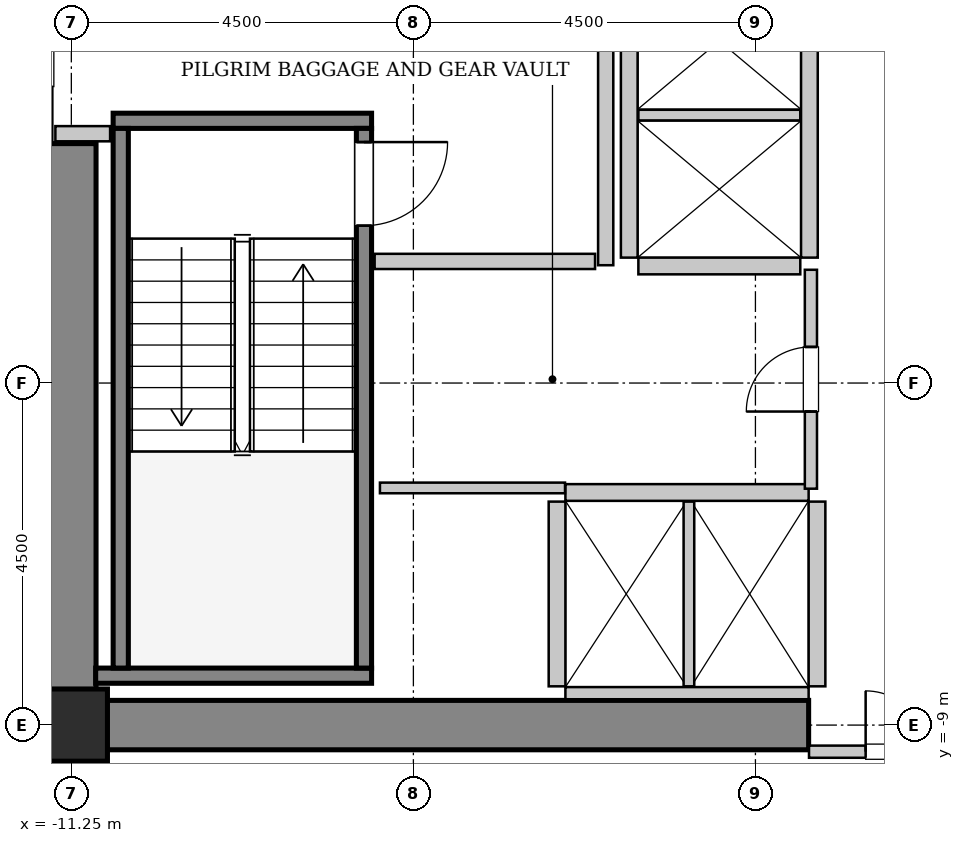
"""IFC4 building model, lengths in metres.
Left out: names, types, materials, properties, quantities, classifications, styles, units other than length and angle.
Written with IfcOpenShell. Run it as: python <this file> out.ifc"""

import sys

from ifc_helpers import new_model, si_unit, direction, frame, frame_2d, origin, origin_2d, place, context, subcontext, project, spatial, rectangle, hollow_rectangle, extrude, source, transform, mapped, element, fill, save


model = new_model("IFC4")
c1 = context("Model", 3, precision=1e-05, world=origin(), true_north=direction((0.0, 1.0)))
c2 = subcontext(c1, "Body", "Model", "MODEL_VIEW")
j1 = project(units=[si_unit("LENGTHUNIT", "METRE"), si_unit("PLANEANGLEUNIT", "RADIAN")], contexts=[c1])
p1 = place(None, origin())
s1 = spatial("IfcSite", under=j1, at=p1, CompositionType="ELEMENT")
p2 = place(p1, origin())
s2 = spatial("IfcBuilding", under=s1, at=p2, CompositionType="ELEMENT")
p3 = place(p2, frame((0.0, 0.0, 82.4)))
s3 = spatial("IfcBuildingStorey", under=s2, at=p3, CompositionType="ELEMENT", Elevation=82.4)
m1 = source(origin(), c2, "Body", "SweptSolid", [
    extrude(rectangle(XDim=10.025, YDim=0.65, at=frame_2d((5.012, 0.0))), origin(), (0.0, 0.0, 1.0), 3.8),
])
p4 = place(p3, frame((-11.575, -9.0, 0.0), z_axis=(0.0, 0.0, 1.0), x_axis=(1.0, 0.0, 0.0)))
e1 = element("IfcWall", 1, at=p4, inside=s3, PredefinedType="SHEAR", context=c2, shape_type="MappedRepresentation", body=[
    mapped(m1, transform((0.0, 0.0, 0.0), x_axis=(1.0, 0.0, 0.0), y_axis=(0.0, 1.0, 0.0), z_axis=(0.0, 0.0, 1.0), scale=1.0)),
])
m2 = source(origin(), c2, "Body", "SweptSolid", [
    extrude(rectangle(XDim=7.325, YDim=0.65, at=frame_2d((3.663, 0.0))), origin(), (0.0, 0.0, 1.0), 3.8),
])
p5 = place(p3, frame((-11.25, -8.675, 0.0), z_axis=(0.0, 0.0, 1.0), x_axis=(0.0, 1.0, 0.0)))
e2 = element("IfcWall", 2, at=p5, inside=s3, PredefinedType="SHEAR", context=c2, shape_type="MappedRepresentation", body=[
    mapped(m2, transform((0.0, 0.0, 0.0), x_axis=(1.0, 0.0, 0.0), y_axis=(0.0, 1.0, 0.0), z_axis=(0.0, 0.0, 1.0), scale=1.0)),
])
m3 = source(origin(), c2, "Body", "SweptSolid", [
    extrude(hollow_rectangle(XDim=0.95, YDim=0.95, WallThickness=0.045, InnerFilletRadius=0.045, OuterFilletRadius=0.09, at=origin_2d()), origin(), (0.0, 0.0, 1.0), 3.8),
])
p6 = place(p3, frame((-11.25, -9.0, 0.0), z_axis=(0.0, 0.0, 1.0), x_axis=(1.0, 0.0, 0.0)))
e3 = element("IfcColumn", 3, at=p6, inside=s3, PredefinedType="COLUMN", context=c2, shape_type="MappedRepresentation", body=[
    mapped(m3, transform((0.0, 0.0, 0.0), x_axis=(1.0, 0.0, 0.0), y_axis=(0.0, 1.0, 0.0), z_axis=(0.0, 0.0, 1.0), scale=1.0)),
])
m4 = source(origin(), c2, "Body", "SweptSolid", [
    extrude(rectangle(XDim=3.4, YDim=0.2, at=frame_2d((1.7, 0.0))), origin(), (0.0, 0.0, 1.0), 3.8),
])
p7 = place(p3, frame((-10.7, -1.05, 0.0), z_axis=(0.0, 0.0, 1.0), x_axis=(1.0, 0.0, 0.0)))
e4 = element("IfcWall", 4, at=p7, inside=s3, PredefinedType="SOLIDWALL", context=c2, shape_type="MappedRepresentation", body=[
    mapped(m4, transform((0.0, 0.0, 0.0), x_axis=(1.0, 0.0, 0.0), y_axis=(0.0, 1.0, 0.0), z_axis=(0.0, 0.0, 1.0), scale=1.0)),
])
m5 = source(origin(), c2, "Body", "SweptSolid", [
    extrude(rectangle(XDim=3.63, YDim=0.2, at=frame_2d((1.815, 0.0))), origin(), (0.0, 0.0, 1.0), 3.8),
])
p8 = place(p3, frame((-10.93, -8.35, 0.0), z_axis=(0.0, 0.0, 1.0), x_axis=(1.0, 0.0, 0.0)))
e5 = element("IfcWall", 5, at=p8, inside=s3, PredefinedType="SOLIDWALL", context=c2, shape_type="MappedRepresentation", body=[
    mapped(m5, transform((0.0, 0.0, 0.0), x_axis=(1.0, 0.0, 0.0), y_axis=(0.0, 1.0, 0.0), z_axis=(0.0, 0.0, 1.0), scale=1.0)),
])
m6 = source(origin(), c2, "Body", "SweptSolid", [
    extrude(rectangle(XDim=7.1, YDim=0.2, at=frame_2d((3.55, 0.0))), origin(), (0.0, 0.0, 1.0), 3.8),
])
p9 = place(p3, frame((-10.6, -1.15, 0.0), z_axis=(0.0, 0.0, 1.0), x_axis=(0.0, -1.0, 0.0)))
e6 = element("IfcWall", 6, at=p9, inside=s3, PredefinedType="SOLIDWALL", context=c2, shape_type="MappedRepresentation", body=[
    mapped(m6, transform((0.0, 0.0, 0.0), x_axis=(1.0, 0.0, 0.0), y_axis=(0.0, 1.0, 0.0), z_axis=(0.0, 0.0, 1.0), scale=1.0)),
])
p10 = place(p3, frame((-7.4, -1.15, 0.0), z_axis=(0.0, 0.0, 1.0), x_axis=(0.0, -1.0, 0.0)))
e7 = element("IfcWall", 7, at=p10, inside=s3, PredefinedType="SOLIDWALL", context=c2, shape_type="MappedRepresentation", body=[
    mapped(m6, transform((0.0, 0.0, 0.0), x_axis=(1.0, 0.0, 0.0), y_axis=(0.0, 1.0, 0.0), z_axis=(0.0, 0.0, 1.0), scale=1.0)),
])
p11 = place(p10, frame((0.18, 0.0, 0.0)))
e8 = element("IfcOpeningElement", 8, at=p11, cuts=e7, PredefinedType="OPENING", context=c2, shape_type="SweptSolid", body=[
    extrude(rectangle(XDim=1.1, YDim=2.15, at=frame_2d((0.55, 1.075))), frame((0.0, 0.11, 0.0), z_axis=(0.0, -1.0, 0.0), x_axis=(1.0, 0.0, 0.0)), (0.0, 0.0, 1.0), 0.22),
])
m7 = source(origin(), c2, "Body", "SweptSolid", [
    extrude(rectangle(XDim=3.2, YDim=0.22, at=frame_2d((1.6, 0.0))), origin(), (0.0, 0.0, 1.0), 3.485),
])
p12 = place(p3, frame((-1.55, -5.94, 0.0), z_axis=(0.0, 0.0, 1.0), x_axis=(-1.0, 0.0, 0.0)))
e9 = element("IfcWall", 9, at=p12, inside=s3, PredefinedType="SOLIDWALL", context=c2, shape_type="MappedRepresentation", body=[
    mapped(m7, transform((0.0, 0.0, 0.0), x_axis=(1.0, 0.0, 0.0), y_axis=(0.0, 1.0, 0.0), z_axis=(0.0, 0.0, 1.0), scale=1.0)),
])
m8 = source(origin(), c2, "Body", "SweptSolid", [
    extrude(rectangle(XDim=3.2, YDim=0.16, at=frame_2d((1.6, 0.0))), origin(), (0.0, 0.0, 1.0), 2.375),
])
p13 = place(p3, frame((-4.75, -8.58, 0.0), z_axis=(0.0, 0.0, 1.0), x_axis=(1.0, 0.0, 0.0)))
e10 = element("IfcWall", 10, at=p13, inside=s3, PredefinedType="PARTITIONING", context=c2, shape_type="MappedRepresentation", body=[
    mapped(m8, transform((0.0, 0.0, 0.0), x_axis=(1.0, 0.0, 0.0), y_axis=(0.0, 1.0, 0.0), z_axis=(0.0, 0.0, 1.0), scale=1.0)),
])
m9 = source(origin(), c2, "Body", "SweptSolid", [
    extrude(rectangle(XDim=2.43, YDim=0.22, at=frame_2d((1.215, 0.0))), origin(), (0.0, 0.0, 1.0), 3.485),
])
p14 = place(p3, frame((-4.86, -6.06, 0.0), z_axis=(0.0, 0.0, 1.0), x_axis=(0.0, -1.0, 0.0)))
e11 = element("IfcWall", 11, at=p14, inside=s3, PredefinedType="SOLIDWALL", context=c2, shape_type="MappedRepresentation", body=[
    mapped(m9, transform((0.0, 0.0, 0.0), x_axis=(1.0, 0.0, 0.0), y_axis=(0.0, 1.0, 0.0), z_axis=(0.0, 0.0, 1.0), scale=1.0)),
])
m10 = source(origin(), c2, "Body", "SweptSolid", [
    extrude(rectangle(XDim=2.43, YDim=0.14, at=frame_2d((1.215, 0.0))), origin(), (0.0, 0.0, 1.0), 3.485),
])
p15 = place(p3, frame((-3.125, -8.49, 0.0), z_axis=(0.0, 0.0, 1.0), x_axis=(0.0, 1.0, 0.0)))
e12 = element("IfcWall", 12, at=p15, inside=s3, PredefinedType="PARTITIONING", context=c2, shape_type="MappedRepresentation", body=[
    mapped(m10, transform((0.0, 0.0, 0.0), x_axis=(1.0, 0.0, 0.0), y_axis=(0.0, 1.0, 0.0), z_axis=(0.0, 0.0, 1.0), scale=1.0)),
])
p16 = place(p3, frame((-1.44, -8.49, 0.0), z_axis=(0.0, 0.0, 1.0), x_axis=(0.0, 1.0, 0.0)))
e13 = element("IfcWall", 13, at=p16, inside=s3, PredefinedType="SOLIDWALL", context=c2, shape_type="MappedRepresentation", body=[
    mapped(m9, transform((0.0, 0.0, 0.0), x_axis=(1.0, 0.0, 0.0), y_axis=(0.0, 1.0, 0.0), z_axis=(0.0, 0.0, 1.0), scale=1.0)),
])
m11 = source(origin(), c2, "Body", "SweptSolid", [
    extrude(rectangle(XDim=5.7, YDim=0.22, at=frame_2d((2.85, 0.0))), origin(), (0.0, 0.0, 1.0), 3.485),
])
for number, where, z_axis, x_axis in (
    (14, (-1.54, -2.85, 0.0), (0.0, 0.0, 1.0), (0.0, 1.0, 0.0)),
    (15, (-3.91, 2.85, 0.0), (0.0, 0.0, 1.0), (0.0, -1.0, 0.0)),
):
    element("IfcWall", number, at=place(p3, frame(where, z_axis=z_axis, x_axis=x_axis)), inside=s3, PredefinedType="SOLIDWALL", context=c2, shape_type="MappedRepresentation", body=[
        mapped(m11, transform((0.0, 0.0, 0.0), x_axis=(1.0, 0.0, 0.0), y_axis=(0.0, 1.0, 0.0), z_axis=(0.0, 0.0, 1.0), scale=1.0)),
    ])
m12 = source(origin(), c2, "Body", "SweptSolid", [
    extrude(rectangle(XDim=2.13, YDim=0.22, at=frame_2d((1.065, 0.0))), origin(), (0.0, 0.0, 1.0), 3.485),
])
p17 = place(p3, frame((-3.79, -2.96, 0.0), z_axis=(0.0, 0.0, 1.0), x_axis=(1.0, 0.0, 0.0)))
e16 = element("IfcWall", 16, at=p17, inside=s3, PredefinedType="SOLIDWALL", context=c2, shape_type="MappedRepresentation", body=[
    mapped(m12, transform((0.0, 0.0, 0.0), x_axis=(1.0, 0.0, 0.0), y_axis=(0.0, 1.0, 0.0), z_axis=(0.0, 0.0, 1.0), scale=1.0)),
])
m13 = source(origin(), c2, "Body", "SweptSolid", [
    extrude(rectangle(XDim=2.13, YDim=0.14, at=frame_2d((1.065, 0.0))), origin(), (0.0, 0.0, 1.0), 3.485),
])
p18 = place(p3, frame((-3.79, -0.975, 0.0), z_axis=(0.0, 0.0, 1.0), x_axis=(1.0, 0.0, 0.0)))
e17 = element("IfcWall", 17, at=p18, inside=s3, PredefinedType="PARTITIONING", context=c2, shape_type="MappedRepresentation", body=[
    mapped(m13, transform((0.0, 0.0, 0.0), x_axis=(1.0, 0.0, 0.0), y_axis=(0.0, 1.0, 0.0), z_axis=(0.0, 0.0, 1.0), scale=1.0)),
])
m14 = source(origin(), c2, "Body", "SweptSolid", [
    extrude(rectangle(XDim=5.9, YDim=0.2, at=frame_2d((2.95, 0.0))), origin(), (0.0, 0.0, 1.0), 3.485),
])
p19 = place(p3, frame((-4.22, -2.95, 0.0), z_axis=(0.0, 0.0, 1.0), x_axis=(0.0, 1.0, 0.0)))
e18 = element("IfcWall", 18, at=p19, inside=s3, PredefinedType="PARTITIONING", context=c2, shape_type="MappedRepresentation", body=[
    mapped(m14, transform((0.0, 0.0, 0.0), x_axis=(1.0, 0.0, 0.0), y_axis=(0.0, 1.0, 0.0), z_axis=(0.0, 0.0, 1.0), scale=1.0)),
])
m15 = source(origin(), c2, "Body", "SweptSolid", [
    extrude(rectangle(XDim=2.9, YDim=0.2, at=frame_2d((1.45, 0.0))), origin(), (0.0, 0.0, 1.0), 3.485),
])
p20 = place(p3, frame((-7.26, -2.9, 0.0), z_axis=(0.0, 0.0, 1.0), x_axis=(1.0, 0.0, 0.0)))
e19 = element("IfcWall", 19, at=p20, inside=s3, PredefinedType="PARTITIONING", context=c2, shape_type="MappedRepresentation", body=[
    mapped(m15, transform((0.0, 0.0, 0.0), x_axis=(1.0, 0.0, 0.0), y_axis=(0.0, 1.0, 0.0), z_axis=(0.0, 0.0, 1.0), scale=1.0)),
])
m16 = source(origin(), c2, "Body", "SweptSolid", [
    extrude(rectangle(XDim=0.72, YDim=0.2, at=frame_2d((0.36, 0.0))), origin(), (0.0, 0.0, 1.0), 3.485),
])
p21 = place(p3, frame((-11.46, -1.22, 0.0), z_axis=(0.0, 0.0, 1.0), x_axis=(1.0, 0.0, 0.0)))
e20 = element("IfcWall", 20, at=p21, inside=s3, PredefinedType="PARTITIONING", context=c2, shape_type="MappedRepresentation", body=[
    mapped(m16, transform((0.0, 0.0, 0.0), x_axis=(1.0, 0.0, 0.0), y_axis=(0.0, 1.0, 0.0), z_axis=(0.0, 0.0, 1.0), scale=1.0)),
])
m17 = source(origin(), c2, "Body", "SweptSolid", [
    extrude(rectangle(XDim=3.09, YDim=0.16, at=frame_2d((1.545, 0.0))), origin(), (0.0, 0.0, 1.0), 2.375),
])
p22 = place(p3, frame((-1.545, -9.35, 0.0), z_axis=(0.0, 0.0, 1.0), x_axis=(1.0, 0.0, 0.0)))
e21 = element("IfcWall", 21, at=p22, inside=s3, PredefinedType="PARTITIONING", context=c2, shape_type="MappedRepresentation", body=[
    mapped(m17, transform((0.0, 0.0, 0.0), x_axis=(1.0, 0.0, 0.0), y_axis=(0.0, 1.0, 0.0), z_axis=(0.0, 0.0, 1.0), scale=1.0)),
])
p23 = place(p22, frame((0.745, 0.0, 0.0)))
e22 = element("IfcOpeningElement", 22, at=p23, cuts=e21, PredefinedType="OPENING", context=c2, shape_type="SweptSolid", body=[
    extrude(rectangle(XDim=1.6, YDim=2.3, at=frame_2d((0.8, 1.15))), frame((0.0, 0.09, 0.0), z_axis=(0.0, -1.0, 0.0), x_axis=(1.0, 0.0, 0.0)), (0.0, 0.0, 1.0), 0.18),
])
m18 = source(origin(), c2, "Body", "SweptSolid", [
    extrude(rectangle(XDim=2.88, YDim=0.16, at=frame_2d((1.44, 0.0))), origin(), (0.0, 0.0, 1.0), 3.485),
])
p24 = place(p3, frame((-1.52, -5.89, 0.0), z_axis=(0.0, 0.0, 1.0), x_axis=(0.0, 1.0, 0.0)))
e23 = element("IfcWall", 23, at=p24, inside=s3, PredefinedType="PARTITIONING", context=c2, shape_type="MappedRepresentation", body=[
    mapped(m18, transform((0.0, 0.0, 0.0), x_axis=(1.0, 0.0, 0.0), y_axis=(0.0, 1.0, 0.0), z_axis=(0.0, 0.0, 1.0), scale=1.0)),
])
p25 = place(p24, frame((1.015, 0.0, 0.0)))
e24 = element("IfcOpeningElement", 24, at=p25, cuts=e23, PredefinedType="OPENING", context=c2, shape_type="SweptSolid", body=[
    extrude(rectangle(XDim=0.85, YDim=2.1, at=frame_2d((0.425, 1.05))), frame((0.0, 0.09, 0.0), z_axis=(0.0, -1.0, 0.0), x_axis=(1.0, 0.0, 0.0)), (0.0, 0.0, 1.0), 0.18),
])
m19 = source(origin(), c2, "Body", "SweptSolid", [
    extrude(rectangle(XDim=2.435, YDim=0.14, at=frame_2d((1.218, 0.0))), origin(), (0.0, 0.0, 1.0), 3.485),
])
p26 = place(p3, frame((-7.19, -5.88, 0.0), z_axis=(0.0, 0.0, 1.0), x_axis=(1.0, 0.0, 0.0)))
e25 = element("IfcWall", 25, at=p26, inside=s3, PredefinedType="PARTITIONING", context=c2, shape_type="MappedRepresentation", body=[
    mapped(m19, transform((0.0, 0.0, 0.0), x_axis=(1.0, 0.0, 0.0), y_axis=(0.0, 1.0, 0.0), z_axis=(0.0, 0.0, 1.0), scale=1.0)),
])
m20 = source(origin(), c2, "Body", "SweptSolid", [
    extrude(rectangle(XDim=1.1, YDim=2.15, at=frame_2d((0.55, 1.075))), frame((0.0, 0.025, 0.0), z_axis=(0.0, -1.0, 0.0), x_axis=(1.0, 0.0, 0.0)), (0.0, 0.0, 1.0), 0.05),
])
p27 = place(p11, origin())
e26 = element("IfcDoor", 26, at=p27, inside=s3, OperationType="SINGLE_SWING_LEFT", PredefinedType="DOOR", context=c2, shape_type="MappedRepresentation", body=[
    mapped(m20, transform((0.0, 0.0, 0.0), x_axis=(1.0, 0.0, 0.0), y_axis=(0.0, 1.0, 0.0), z_axis=(0.0, 0.0, 1.0), scale=1.0)),
])
fill(e8, e26)
m21 = source(origin(), c2, "Body", "SweptSolid", [
    extrude(rectangle(XDim=1.6, YDim=2.3, at=frame_2d((0.8, 1.15))), frame((0.0, 0.025, 0.0), z_axis=(0.0, -1.0, 0.0), x_axis=(1.0, 0.0, 0.0)), (0.0, 0.0, 1.0), 0.05),
])
p28 = place(p23, origin())
e27 = element("IfcDoor", 27, at=p28, inside=s3, OperationType="DOUBLE_DOOR_SINGLE_SWING", PredefinedType="DOOR", context=c2, shape_type="MappedRepresentation", body=[
    mapped(m21, transform((0.0, 0.0, 0.0), x_axis=(1.0, 0.0, 0.0), y_axis=(0.0, 1.0, 0.0), z_axis=(0.0, 0.0, 1.0), scale=1.0)),
])
fill(e22, e27)
m22 = source(origin(), c2, "Body", "SweptSolid", [
    extrude(rectangle(XDim=0.85, YDim=2.1, at=frame_2d((0.425, 1.05))), frame((0.0, 0.025, 0.0), z_axis=(0.0, -1.0, 0.0), x_axis=(1.0, 0.0, 0.0)), (0.0, 0.0, 1.0), 0.05),
])
p29 = place(p25, origin())
e28 = element("IfcDoor", 28, at=p29, inside=s3, OperationType="SINGLE_SWING_LEFT", PredefinedType="DOOR", context=c2, shape_type="MappedRepresentation", body=[
    mapped(m22, transform((0.0, 0.0, 0.0), x_axis=(1.0, 0.0, 0.0), y_axis=(0.0, 1.0, 0.0), z_axis=(0.0, 0.0, 1.0), scale=1.0)),
])
fill(e24, e28)
save(model, sys.argv[1])
